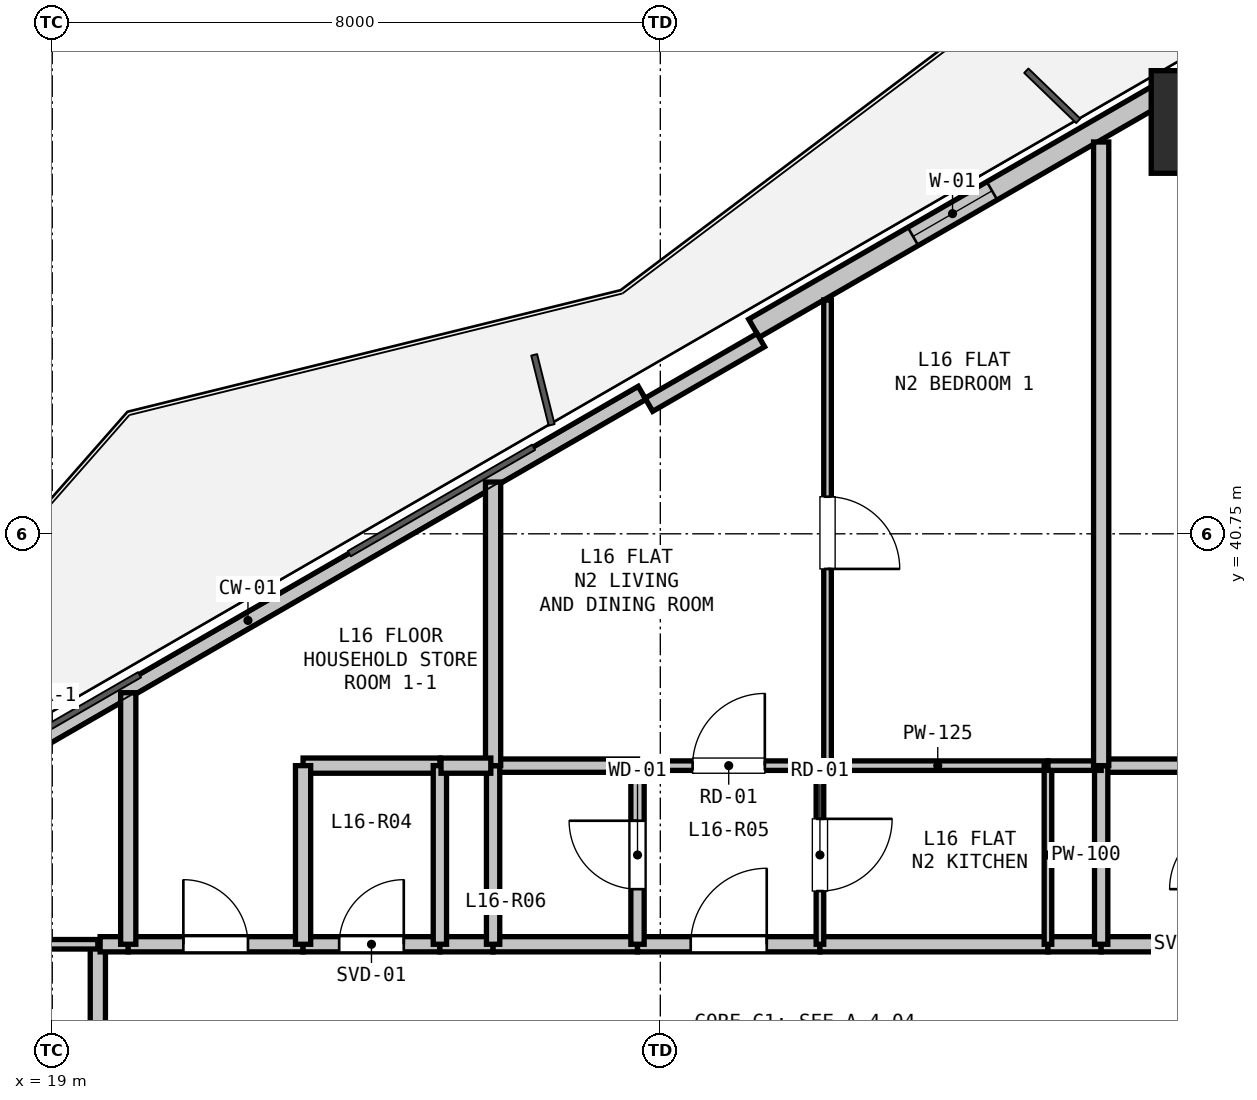
"""IFC4 building model, lengths in metres.
Left out: names, types, materials, properties, quantities, classifications, styles, units other than length and angle.
Written with IfcOpenShell. Run it as: python <this file> out.ifc"""

import sys

from ifc_helpers import new_model, si_unit, direction, frame, frame_2d, origin, origin_2d, place, context, subcontext, project, spatial, rectangle, hollow_rectangle, extrude, element, fill, save


model = new_model("IFC4")
c1 = context("Model", 3, precision=1e-05, world=origin(), true_north=direction((0.0, 1.0)))
c2 = subcontext(c1, "Body", "Model", "MODEL_VIEW")
j1 = project(units=[si_unit("LENGTHUNIT", "METRE"), si_unit("PLANEANGLEUNIT", "RADIAN")], contexts=[c1])
p1 = place(None, origin())
s1 = spatial("IfcSite", under=j1, at=p1, CompositionType="ELEMENT")
p2 = place(p1, origin())
s2 = spatial("IfcBuilding", under=s1, at=p2, CompositionType="ELEMENT")
p3 = place(p2, frame((0.0, 0.0, 58.8)))
s3 = spatial("IfcBuildingStorey", under=s2, at=p3, CompositionType="ELEMENT", Elevation=58.8)
p4 = place(p3, frame((34.133, 46.168, 0.0), z_axis=(0.0, 0.0, 1.0), x_axis=(1.0, 0.0, 0.0)))
e1 = element("IfcColumn", 1, at=p4, inside=s3, PredefinedType="COLUMN", context=c2, shape_type="SweptSolid", body=[
    extrude(hollow_rectangle(XDim=1.35, YDim=1.35, WallThickness=0.036, at=origin_2d()), origin(), (0.0, 0.0, 1.0), 3.3),
])
p5 = place(p3, frame((16.39, 36.617, 0.0), z_axis=(0.0, 0.0, 1.0), x_axis=(0.866027351828, 0.499996625875, 0.0)))
e2 = element("IfcWall", 2, at=p5, inside=s3, PredefinedType="PARAPET", context=c2, shape_type="SweptSolid", body=[
    extrude(rectangle(XDim=11.973, YDim=0.2, at=frame_2d((5.987, 0.0))), origin(), (0.0, 0.0, 1.0), 0.2),
])
p6 = place(p3, frame((28.232, 43.454, 0.0), z_axis=(0.0, 0.0, 1.0), x_axis=(0.86603192154, 0.499988710747, 0.0)))
e3 = element("IfcWall", 3, at=p6, inside=s3, PredefinedType="SOLIDWALL", context=c2, shape_type="SweptSolid", body=[
    extrude(rectangle(XDim=12.673, YDim=0.275, at=frame_2d((6.336, 0.0))), origin(), (0.0, 0.0, 1.0), 2.64),
])
p7 = place(p6, frame((2.417, 0.0, 0.9)))
e4 = element("IfcOpeningElement", 4, at=p7, cuts=e3, PredefinedType="OPENING", context=c2, shape_type="SweptSolid", body=[
    extrude(rectangle(XDim=1.2, YDim=1.4, at=frame_2d((0.6, 0.7))), frame((0.0, 0.147, 0.0), z_axis=(0.0, -1.0, 0.0), x_axis=(1.0, 0.0, 0.0)), (0.0, 0.0, 1.0), 0.295),
])
p8 = place(p6, frame((8.251, 0.0, 0.9)))
e5 = element("IfcOpeningElement", 5, at=p8, cuts=e3, PredefinedType="OPENING", context=c2, shape_type="SweptSolid", body=[
    extrude(rectangle(XDim=1.2, YDim=1.4, at=frame_2d((0.6, 0.7))), frame((0.0, 0.147, 0.0), z_axis=(0.0, -1.0, 0.0), x_axis=(1.0, 0.0, 0.0)), (0.0, 0.0, 1.0), 0.295),
])
p9 = place(p3, frame((26.85, 42.448, 0.0), z_axis=(0.0, 0.0, 1.0), x_axis=(0.86605165483, 0.499954529098, 0.0)))
e6 = element("IfcWall", 6, at=p9, inside=s3, PredefinedType="PARAPET", context=c2, shape_type="SweptSolid", body=[
    extrude(rectangle(XDim=1.7, YDim=0.2, at=frame_2d((0.85, 0.0))), origin(), (0.0, 0.0, 1.0), 2.64),
])
p10 = place(p3, frame((19.6, 31.1, 0.0), z_axis=(0.0, 0.0, 1.0), x_axis=(0.0, 1.0, 0.0)))
e7 = element("IfcWall", 7, at=p10, inside=s3, PredefinedType="PARTITIONING", context=c2, shape_type="SweptSolid", body=[
    extrude(rectangle(XDim=4.25, YDim=0.2, at=frame_2d((2.125, 0.0))), origin(), (0.0, 0.0, 1.0), 2.317),
])
p11 = place(p3, frame((19.63, 35.35, 0.0), z_axis=(0.0, 0.0, 1.0), x_axis=(1.0, 0.0, 0.0)))
e8 = element("IfcWall", 8, at=p11, inside=s3, PredefinedType="PARTITIONING", context=c2, shape_type="SweptSolid", body=[
    extrude(rectangle(XDim=0.37, YDim=0.2, at=frame_2d((0.185, 0.0))), origin(), (0.0, 0.0, 1.0), 3.02),
])
p12 = place(p3, frame((20.0, 35.35, 0.0), z_axis=(0.0, 0.0, 1.0), x_axis=(1.0, 0.0, 0.0)))
e9 = element("IfcWall", 9, at=p12, inside=s3, PredefinedType="PARTITIONING", context=c2, shape_type="SweptSolid", body=[
    extrude(rectangle(XDim=2.3, YDim=0.2, at=frame_2d((1.15, 0.0))), origin(), (0.0, 0.0, 1.0), 3.02),
])
p13 = place(p12, frame((0.725, 0.0, 0.0)))
e10 = element("IfcOpeningElement", 10, at=p13, cuts=e9, PredefinedType="OPENING", context=c2, shape_type="SweptSolid", body=[
    extrude(rectangle(XDim=0.85, YDim=2.1, at=frame_2d((0.425, 1.05))), frame((0.0, 0.11, 0.0), z_axis=(0.0, -1.0, 0.0), x_axis=(1.0, 0.0, 0.0)), (0.0, 0.0, 1.0), 0.22),
])
p14 = place(p3, frame((22.3, 35.35, 0.0), z_axis=(0.0, 0.0, 1.0), x_axis=(1.0, 0.0, 0.0)))
e11 = element("IfcWall", 11, at=p14, inside=s3, PredefinedType="PARTITIONING", context=c2, shape_type="SweptSolid", body=[
    extrude(rectangle(XDim=1.8, YDim=0.2, at=frame_2d((0.9, 0.0))), origin(), (0.0, 0.0, 1.0), 3.02),
])
p15 = place(p14, frame((0.475, 0.0, 0.0)))
e12 = element("IfcOpeningElement", 12, at=p15, cuts=e11, PredefinedType="OPENING", context=c2, shape_type="SweptSolid", body=[
    extrude(rectangle(XDim=0.85, YDim=2.1, at=frame_2d((0.425, 1.05))), frame((0.0, 0.11, 0.0), z_axis=(0.0, -1.0, 0.0), x_axis=(1.0, 0.0, 0.0)), (0.0, 0.0, 1.0), 0.22),
])
p16 = place(p3, frame((24.1, 35.35, 0.0), z_axis=(0.0, 0.0, 1.0), x_axis=(1.0, 0.0, 0.0)))
e13 = element("IfcWall", 13, at=p16, inside=s3, PredefinedType="PARTITIONING", context=c2, shape_type="SweptSolid", body=[
    extrude(rectangle(XDim=0.7, YDim=0.2, at=frame_2d((0.35, 0.0))), origin(), (0.0, 0.0, 1.0), 3.02),
])
p17 = place(p3, frame((24.8, 35.35, 0.0), z_axis=(0.0, 0.0, 1.0), x_axis=(1.0, 0.0, 0.0)))
e14 = element("IfcWall", 14, at=p17, inside=s3, PredefinedType="PARTITIONING", context=c2, shape_type="SweptSolid", body=[
    extrude(rectangle(XDim=1.9, YDim=0.2, at=frame_2d((0.95, 0.0))), origin(), (0.0, 0.0, 1.0), 3.02),
])
p18 = place(p3, frame((26.7, 35.35, 0.0), z_axis=(0.0, 0.0, 1.0), x_axis=(1.0, 0.0, 0.0)))
e15 = element("IfcWall", 15, at=p18, inside=s3, PredefinedType="PARTITIONING", context=c2, shape_type="SweptSolid", body=[
    extrude(rectangle(XDim=2.4, YDim=0.2, at=frame_2d((1.2, 0.0))), origin(), (0.0, 0.0, 1.0), 3.02),
])
p19 = place(p18, frame((0.7, 0.0, 0.0)))
e16 = element("IfcOpeningElement", 16, at=p19, cuts=e15, PredefinedType="OPENING", context=c2, shape_type="SweptSolid", body=[
    extrude(rectangle(XDim=1.0, YDim=2.15, at=frame_2d((0.5, 1.075))), frame((0.0, 0.11, 0.0), z_axis=(0.0, -1.0, 0.0), x_axis=(1.0, 0.0, 0.0)), (0.0, 0.0, 1.0), 0.22),
])
p20 = place(p3, frame((29.1, 35.35, 0.0), z_axis=(0.0, 0.0, 1.0), x_axis=(1.0, 0.0, 0.0)))
e17 = element("IfcWall", 17, at=p20, inside=s3, PredefinedType="PARTITIONING", context=c2, shape_type="SweptSolid", body=[
    extrude(rectangle(XDim=3.0, YDim=0.2, at=frame_2d((1.5, 0.0))), origin(), (0.0, 0.0, 1.0), 3.02),
])
p21 = place(p3, frame((32.1, 35.35, 0.0), z_axis=(0.0, 0.0, 1.0), x_axis=(1.0, 0.0, 0.0)))
e18 = element("IfcWall", 18, at=p21, inside=s3, PredefinedType="PARTITIONING", context=c2, shape_type="SweptSolid", body=[
    extrude(rectangle(XDim=0.7, YDim=0.2, at=frame_2d((0.35, 0.0))), origin(), (0.0, 0.0, 1.0), 3.02),
])
p22 = place(p3, frame((32.8, 35.35, 0.0), z_axis=(0.0, 0.0, 1.0), x_axis=(1.0, 0.0, 0.0)))
e19 = element("IfcWall", 19, at=p22, inside=s3, PredefinedType="PARTITIONING", context=c2, shape_type="SweptSolid", body=[
    extrude(rectangle(XDim=1.8, YDim=0.2, at=frame_2d((0.9, 0.0))), origin(), (0.0, 0.0, 1.0), 3.02),
])
p23 = place(p3, frame((26.7, 37.7, 0.0), z_axis=(0.0, 0.0, 1.0), x_axis=(1.0, 0.0, 0.0)))
e20 = element("IfcWall", 20, at=p23, inside=s3, PredefinedType="PARTITIONING", context=c2, shape_type="SweptSolid", body=[
    extrude(rectangle(XDim=2.4, YDim=0.125, at=frame_2d((1.2, 0.0))), origin(), (0.0, 0.0, 1.0), 3.02),
])
p24 = place(p23, frame((0.725, 0.0, 0.0)))
e21 = element("IfcOpeningElement", 21, at=p24, cuts=e20, PredefinedType="OPENING", context=c2, shape_type="SweptSolid", body=[
    extrude(rectangle(XDim=0.95, YDim=2.1, at=frame_2d((0.475, 1.05))), frame((0.0, 0.073, 0.0), z_axis=(0.0, -1.0, 0.0), x_axis=(1.0, 0.0, 0.0)), (0.0, 0.0, 1.0), 0.145),
])
p25 = place(p3, frame((29.1, 37.7, 0.0), z_axis=(0.0, 0.0, 1.0), x_axis=(0.0, -1.0, 0.0)))
e22 = element("IfcWall", 22, at=p25, inside=s3, PredefinedType="PARTITIONING", context=c2, shape_type="SweptSolid", body=[
    extrude(rectangle(XDim=2.35, YDim=0.1, at=frame_2d((1.175, 0.0))), origin(), (0.0, 0.0, 1.0), 3.02),
])
p26 = place(p25, frame((0.7, 0.0, 0.0)))
e23 = element("IfcOpeningElement", 23, at=p26, cuts=e22, PredefinedType="OPENING", context=c2, shape_type="SweptSolid", body=[
    extrude(rectangle(XDim=0.95, YDim=2.1, at=frame_2d((0.475, 1.05))), frame((0.0, 0.06, 0.0), z_axis=(0.0, -1.0, 0.0), x_axis=(1.0, 0.0, 0.0)), (0.0, 0.0, 1.0), 0.12),
])
p27 = place(p3, frame((26.7, 35.35, 0.0), z_axis=(0.0, 0.0, 1.0), x_axis=(0.0, 1.0, 0.0)))
e24 = element("IfcWall", 24, at=p27, inside=s3, PredefinedType="PLUMBINGWALL", context=c2, shape_type="SweptSolid", body=[
    extrude(rectangle(XDim=2.35, YDim=0.175, at=frame_2d((1.175, 0.0))), origin(), (0.0, 0.0, 1.0), 3.02),
])
p28 = place(p27, frame((0.725, 0.0, 0.0)))
e25 = element("IfcOpeningElement", 25, at=p28, cuts=e24, PredefinedType="OPENING", context=c2, shape_type="SweptSolid", body=[
    extrude(rectangle(XDim=0.9, YDim=2.1, at=frame_2d((0.45, 1.05))), frame((0.0, 0.097, 0.0), z_axis=(0.0, -1.0, 0.0), x_axis=(1.0, 0.0, 0.0)), (0.0, 0.0, 1.0), 0.195),
])
p29 = place(p3, frame((22.3, 37.7, 0.0), z_axis=(0.0, 0.0, 1.0), x_axis=(1.0, 0.0, 0.0)))
e26 = element("IfcWall", 26, at=p29, inside=s3, PredefinedType="PARTITIONING", context=c2, shape_type="SweptSolid", body=[
    extrude(rectangle(XDim=1.8, YDim=0.2, at=frame_2d((0.9, 0.0))), origin(), (0.0, 0.0, 1.0), 3.02),
])
p30 = place(p3, frame((24.1, 37.7, 0.0), z_axis=(0.0, 0.0, 1.0), x_axis=(0.0, -1.0, 0.0)))
e27 = element("IfcWall", 27, at=p30, inside=s3, PredefinedType="PLUMBINGWALL", context=c2, shape_type="SweptSolid", body=[
    extrude(rectangle(XDim=2.35, YDim=0.175, at=frame_2d((1.175, 0.0))), origin(), (0.0, 0.0, 1.0), 3.02),
])
p31 = place(p3, frame((22.3, 35.35, 0.0), z_axis=(0.0, 0.0, 1.0), x_axis=(0.0, 1.0, 0.0)))
e28 = element("IfcWall", 28, at=p31, inside=s3, PredefinedType="PARTITIONING", context=c2, shape_type="SweptSolid", body=[
    extrude(rectangle(XDim=2.35, YDim=0.2, at=frame_2d((1.175, 0.0))), origin(), (0.0, 0.0, 1.0), 3.02),
])
p32 = place(p3, frame((24.8, 37.7, 0.0), z_axis=(0.0, 0.0, 1.0), x_axis=(1.0, 0.0, 0.0)))
e29 = element("IfcWall", 29, at=p32, inside=s3, PredefinedType="PLUMBINGWALL", context=c2, shape_type="SweptSolid", body=[
    extrude(rectangle(XDim=1.9, YDim=0.175, at=frame_2d((0.95, 0.0))), origin(), (0.0, 0.0, 1.0), 3.02),
])
p33 = place(p3, frame((24.8, 35.35, 0.0), z_axis=(0.0, 0.0, 1.0), x_axis=(0.0, 1.0, 0.0)))
e30 = element("IfcWall", 30, at=p33, inside=s3, PredefinedType="PLUMBINGWALL", context=c2, shape_type="SweptSolid", body=[
    extrude(rectangle(XDim=2.35, YDim=0.175, at=frame_2d((1.175, 0.0))), origin(), (0.0, 0.0, 1.0), 3.02),
])
p34 = place(p3, frame((29.2, 37.7, 0.0), z_axis=(0.0, 0.0, 1.0), x_axis=(1.0, 0.0, 0.0)))
e31 = element("IfcWall", 31, at=p34, inside=s3, PredefinedType="PARTITIONING", context=c2, shape_type="SweptSolid", body=[
    extrude(rectangle(XDim=2.9, YDim=0.125, at=frame_2d((1.45, 0.0))), origin(), (0.0, 0.0, 1.0), 3.02),
])
p35 = place(p3, frame((32.1, 37.7, 0.0), z_axis=(0.0, 0.0, 1.0), x_axis=(0.0, -1.0, 0.0)))
e32 = element("IfcWall", 32, at=p35, inside=s3, PredefinedType="PARTITIONING", context=c2, shape_type="SweptSolid", body=[
    extrude(rectangle(XDim=2.35, YDim=0.1, at=frame_2d((1.175, 0.0))), origin(), (0.0, 0.0, 1.0), 3.02),
])
p36 = place(p3, frame((32.8, 37.7, 0.0), z_axis=(0.0, 0.0, 1.0), x_axis=(1.0, 0.0, 0.0)))
e33 = element("IfcWall", 33, at=p36, inside=s3, PredefinedType="PLUMBINGWALL", context=c2, shape_type="SweptSolid", body=[
    extrude(rectangle(XDim=1.8, YDim=0.175, at=frame_2d((0.9, 0.0))), origin(), (0.0, 0.0, 1.0), 3.02),
])
p37 = place(p3, frame((32.8, 35.35, 0.0), z_axis=(0.0, 0.0, 1.0), x_axis=(0.0, 1.0, 0.0)))
e34 = element("IfcWall", 34, at=p37, inside=s3, PredefinedType="PLUMBINGWALL", context=c2, shape_type="SweptSolid", body=[
    extrude(rectangle(XDim=2.35, YDim=0.175, at=frame_2d((1.175, 0.0))), origin(), (0.0, 0.0, 1.0), 3.02),
])
p38 = place(p3, frame((17.15, 35.35, 0.0), z_axis=(0.0, 0.0, 1.0), x_axis=(1.0, 0.0, 0.0)))
e35 = element("IfcWall", 35, at=p38, inside=s3, PredefinedType="PARTITIONING", context=c2, shape_type="SweptSolid", body=[
    extrude(rectangle(XDim=2.45, YDim=0.125, at=frame_2d((1.225, 0.0))), origin(), (0.0, 0.0, 1.0), 3.02),
])
p39 = place(p3, frame((24.8, 41.431, 0.0), z_axis=(0.0, 0.0, 1.0), x_axis=(0.0, -1.0, 0.0)))
e36 = element("IfcWall", 36, at=p39, inside=s3, PredefinedType="PARTITIONING", context=c2, shape_type="SweptSolid", body=[
    extrude(rectangle(XDim=3.731, YDim=0.2, at=frame_2d((1.865, 0.0))), origin(), (0.0, 0.0, 1.0), 2.365),
])
p40 = place(p3, frame((24.77, 37.7, 0.0), z_axis=(0.0, 0.0, 1.0), x_axis=(-1.0, 0.0, 0.0)))
e37 = element("IfcWall", 37, at=p40, inside=s3, PredefinedType="PARTITIONING", context=c2, shape_type="SweptSolid", body=[
    extrude(rectangle(XDim=0.655, YDim=0.2, at=frame_2d((0.328, 0.0))), origin(), (0.0, 0.0, 1.0), 3.02),
])
p41 = place(p3, frame((20.0, 35.35, 0.0), z_axis=(0.0, 0.0, 1.0), x_axis=(0.0, 1.0, 0.0)))
e38 = element("IfcWall", 38, at=p41, inside=s3, PredefinedType="PARTITIONING", context=c2, shape_type="SweptSolid", body=[
    extrude(rectangle(XDim=3.31, YDim=0.2, at=frame_2d((1.655, 0.0))), origin(), (0.0, 0.0, 1.0), 2.365),
])
p42 = place(p3, frame((29.2, 43.826, 0.0), z_axis=(0.0, 0.0, 1.0), x_axis=(0.0, -1.0, 0.0)))
e39 = element("IfcWall", 39, at=p42, inside=s3, PredefinedType="PARTITIONING", context=c2, shape_type="SweptSolid", body=[
    extrude(rectangle(XDim=6.126, YDim=0.1, at=frame_2d((3.063, 0.0))), origin(), (0.0, 0.0, 1.0), 2.365),
])
p43 = place(p42, frame((2.588, 0.0, 0.0)))
e40 = element("IfcOpeningElement", 40, at=p43, cuts=e39, PredefinedType="OPENING", context=c2, shape_type="SweptSolid", body=[
    extrude(rectangle(XDim=0.95, YDim=2.1, at=frame_2d((0.475, 1.05))), frame((0.0, 0.06, 0.0), z_axis=(0.0, -1.0, 0.0), x_axis=(1.0, 0.0, 0.0)), (0.0, 0.0, 1.0), 0.12),
])
p44 = place(p3, frame((32.8, 37.7, 0.0), z_axis=(0.0, 0.0, 1.0), x_axis=(-1.0, 0.0, 0.0)))
e41 = element("IfcWall", 41, at=p44, inside=s3, PredefinedType="PARTITIONING", context=c2, shape_type="SweptSolid", body=[
    extrude(rectangle(XDim=0.7, YDim=0.125, at=frame_2d((0.35, 0.0))), origin(), (0.0, 0.0, 1.0), 3.02),
])
p45 = place(p3, frame((32.8, 45.905, 0.0), z_axis=(0.0, 0.0, 1.0), x_axis=(0.0, -1.0, 0.0)))
e42 = element("IfcWall", 42, at=p45, inside=s3, PredefinedType="PARTITIONING", context=c2, shape_type="SweptSolid", body=[
    extrude(rectangle(XDim=8.205, YDim=0.2, at=frame_2d((4.103, 0.0))), origin(), (0.0, 0.0, 1.0), 2.365),
])
p46 = place(p7, origin())
e43 = element("IfcWindow", 43, at=p46, inside=s3, PartitioningType="SINGLE_PANEL", PredefinedType="WINDOW", context=c2, shape_type="SweptSolid", body=[
    extrude(rectangle(XDim=1.2, YDim=1.4, at=frame_2d((0.6, 0.7))), frame((0.0, 0.03, 0.0), z_axis=(0.0, -1.0, 0.0), x_axis=(1.0, 0.0, 0.0)), (0.0, 0.0, 1.0), 0.06),
])
fill(e4, e43)
p47 = place(p19, origin())
e44 = element("IfcDoor", 44, at=p47, inside=s3, OperationType="SINGLE_SWING_RIGHT", PredefinedType="DOOR", context=c2, shape_type="SweptSolid", body=[
    extrude(rectangle(XDim=1.0, YDim=2.15, at=frame_2d((0.5, 1.075))), frame((0.0, 0.025, 0.0), z_axis=(0.0, -1.0, 0.0), x_axis=(1.0, 0.0, 0.0)), (0.0, 0.0, 1.0), 0.05),
])
fill(e16, e44)
p48 = place(p15, origin())
e45 = element("IfcDoor", 45, at=p48, inside=s3, OperationType="SINGLE_SWING_RIGHT", PredefinedType="DOOR", context=c2, shape_type="SweptSolid", body=[
    extrude(rectangle(XDim=0.85, YDim=2.1, at=frame_2d((0.425, 1.05))), frame((0.0, 0.025, 0.0), z_axis=(0.0, -1.0, 0.0), x_axis=(1.0, 0.0, 0.0)), (0.0, 0.0, 1.0), 0.05),
])
fill(e12, e45)
p49 = place(p13, origin())
e46 = element("IfcDoor", 46, at=p49, inside=s3, OperationType="SINGLE_SWING_LEFT", PredefinedType="DOOR", context=c2, shape_type="SweptSolid", body=[
    extrude(rectangle(XDim=0.85, YDim=2.1, at=frame_2d((0.425, 1.05))), frame((0.0, 0.025, 0.0), z_axis=(0.0, -1.0, 0.0), x_axis=(1.0, 0.0, 0.0)), (0.0, 0.0, 1.0), 0.05),
])
fill(e10, e46)
p50 = place(p28, origin())
e47 = element("IfcDoor", 47, at=p50, inside=s3, OperationType="SINGLE_SWING_RIGHT", PredefinedType="DOOR", context=c2, shape_type="SweptSolid", body=[
    extrude(rectangle(XDim=0.9, YDim=2.1, at=frame_2d((0.45, 1.05))), frame((0.0, 0.025, 0.0), z_axis=(0.0, -1.0, 0.0), x_axis=(1.0, 0.0, 0.0)), (0.0, 0.0, 1.0), 0.05),
])
fill(e25, e47)
p51 = place(p26, origin())
e48 = element("IfcDoor", 48, at=p51, inside=s3, OperationType="SINGLE_SWING_LEFT", PredefinedType="DOOR", context=c2, shape_type="SweptSolid", body=[
    extrude(rectangle(XDim=0.95, YDim=2.1, at=frame_2d((0.475, 1.05))), frame((0.0, 0.025, 0.0), z_axis=(0.0, -1.0, 0.0), x_axis=(1.0, 0.0, 0.0)), (0.0, 0.0, 1.0), 0.05),
])
fill(e23, e48)
p52 = place(p24, origin())
e49 = element("IfcDoor", 49, at=p52, inside=s3, OperationType="SINGLE_SWING_RIGHT", PredefinedType="DOOR", context=c2, shape_type="SweptSolid", body=[
    extrude(rectangle(XDim=0.95, YDim=2.1, at=frame_2d((0.475, 1.05))), frame((0.0, 0.025, 0.0), z_axis=(0.0, -1.0, 0.0), x_axis=(1.0, 0.0, 0.0)), (0.0, 0.0, 1.0), 0.05),
])
fill(e21, e49)
p53 = place(p43, origin())
e50 = element("IfcDoor", 50, at=p53, inside=s3, OperationType="SINGLE_SWING_RIGHT", PredefinedType="DOOR", context=c2, shape_type="SweptSolid", body=[
    extrude(rectangle(XDim=0.95, YDim=2.1, at=frame_2d((0.475, 1.05))), frame((0.0, 0.025, 0.0), z_axis=(0.0, -1.0, 0.0), x_axis=(1.0, 0.0, 0.0)), (0.0, 0.0, 1.0), 0.05),
])
fill(e40, e50)
save(model, sys.argv[1])
